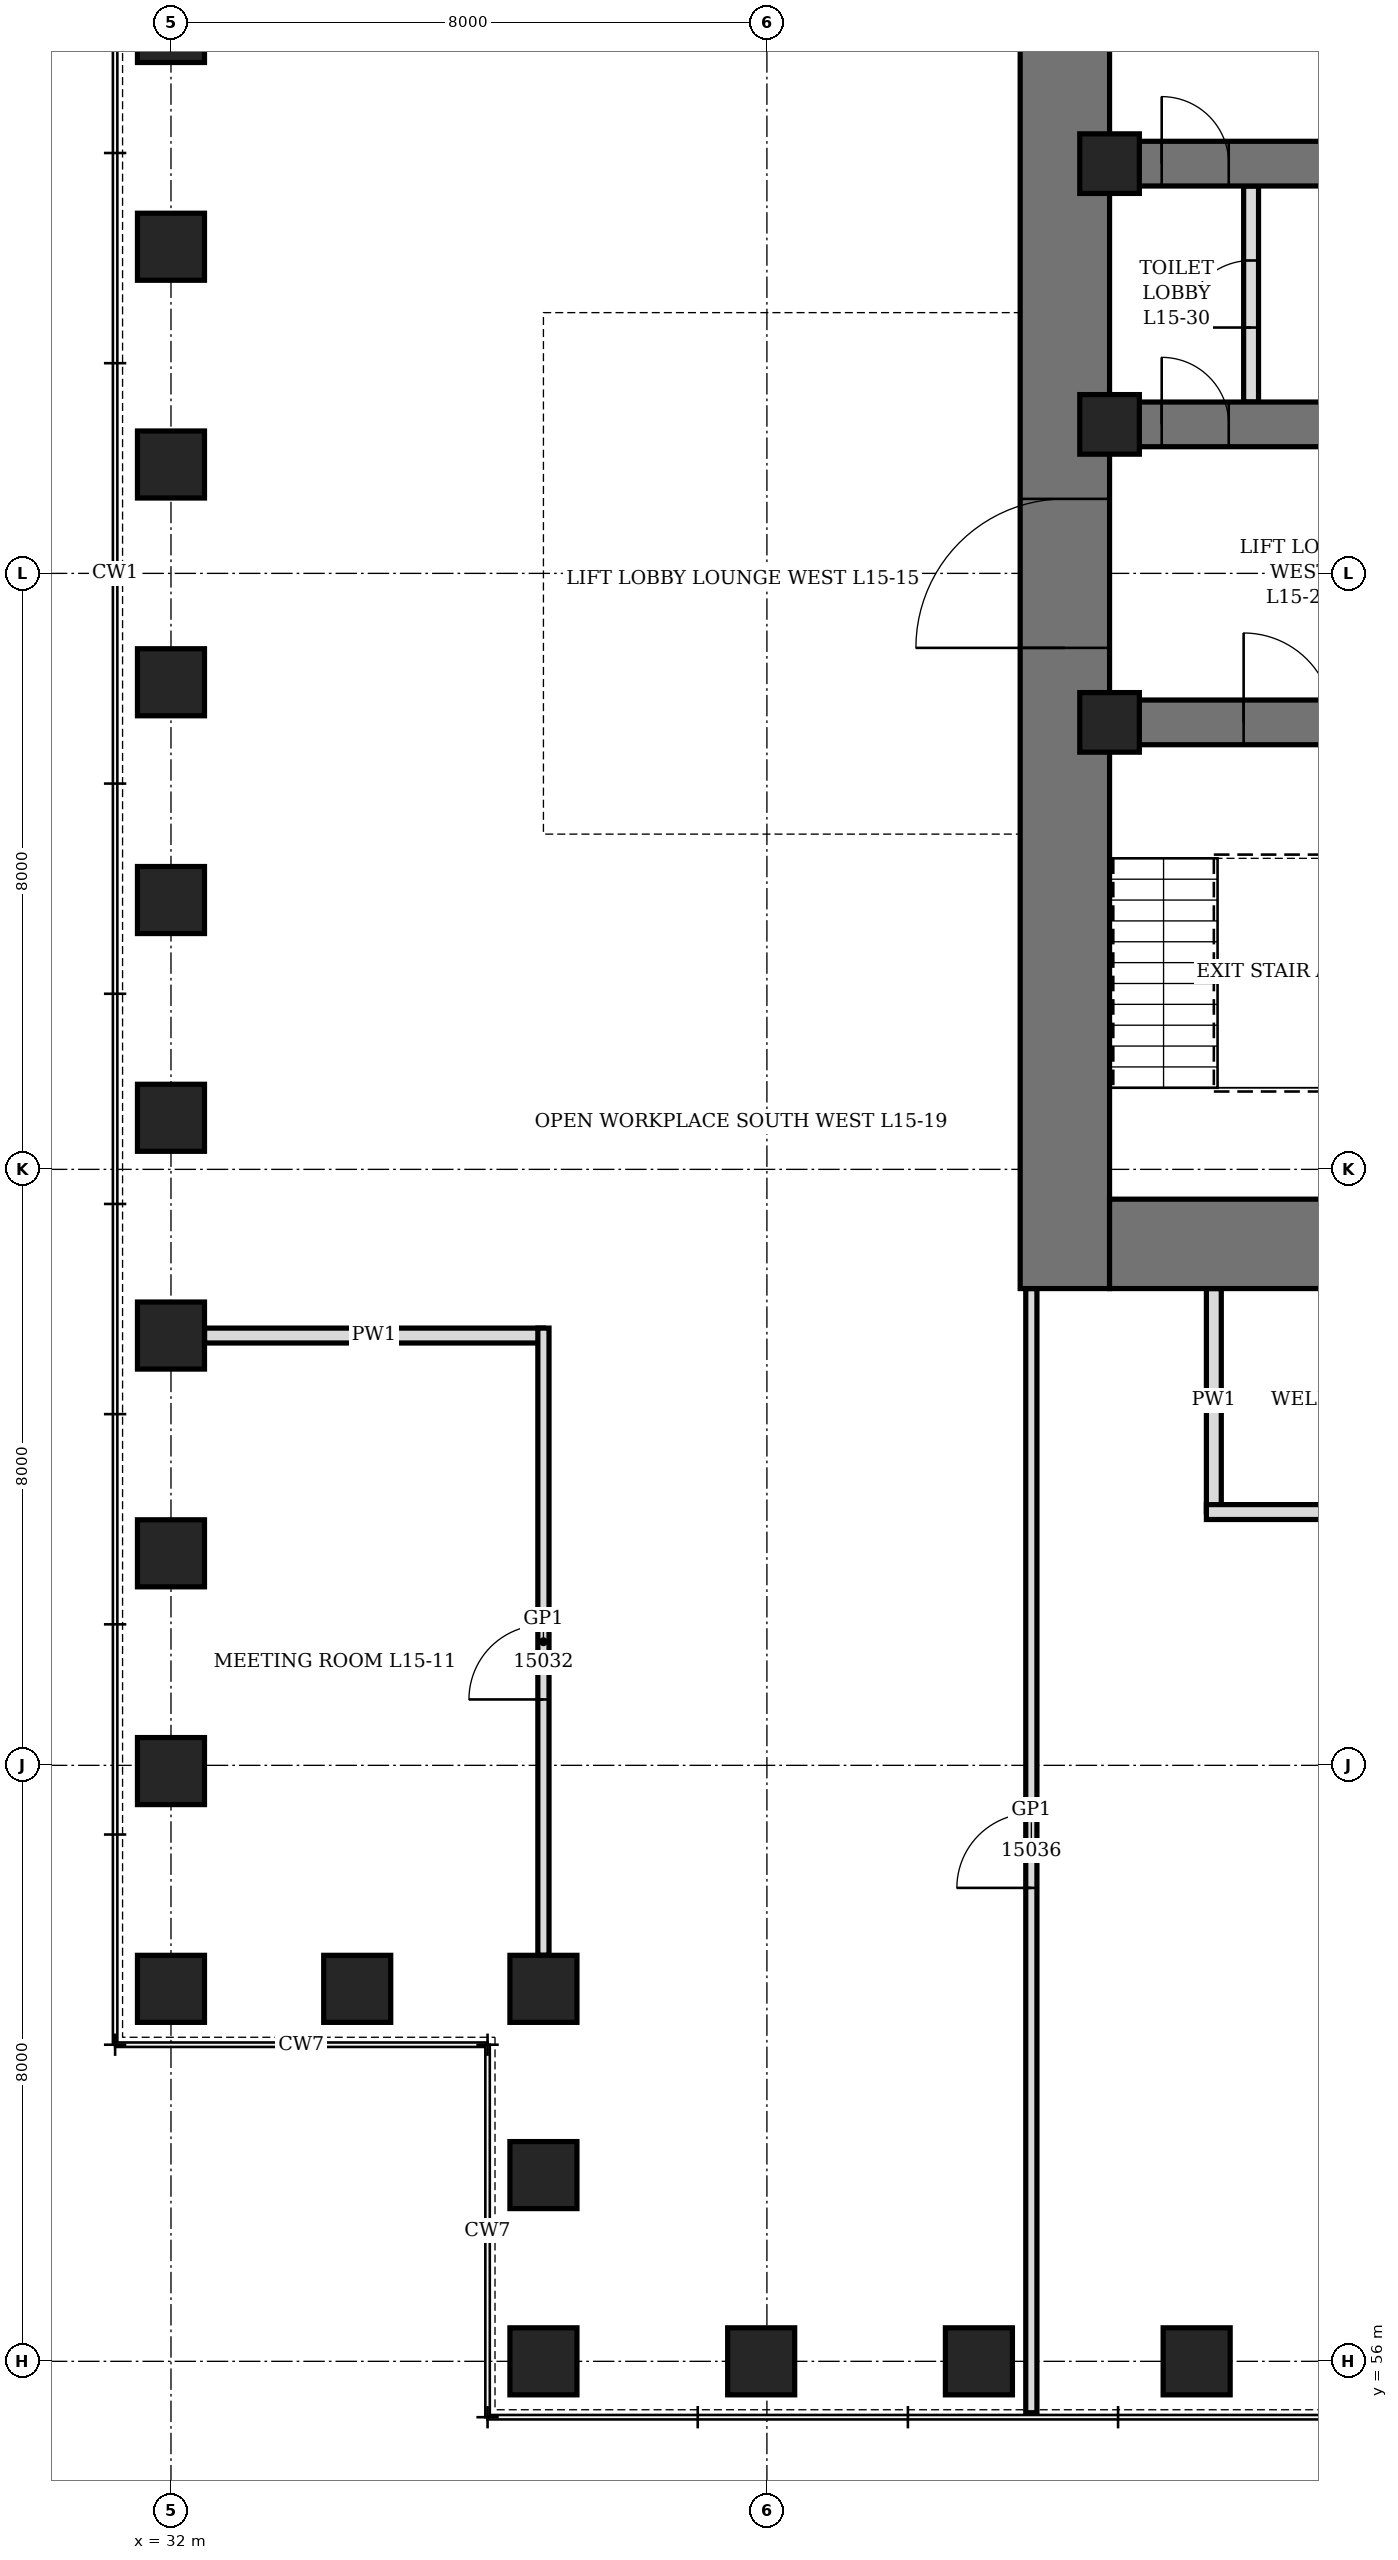
"""IFC4 building model, lengths in metres.
Left out: names, types, materials, properties, quantities, classifications, styles, units other than length and angle.
Written with IfcOpenShell. Run it as: python <this file> out.ifc"""

import sys

from ifc_helpers import new_model, si_unit, direction, frame, frame_2d, origin, origin_2d, place, context, subcontext, project, spatial, rectangle, hollow_rectangle, extrude, element, fill, save


model = new_model("IFC4")
c1 = context("Model", 3, precision=1e-05, world=origin(), true_north=direction((0.0, 1.0)))
c2 = subcontext(c1, "Body", "Model", "MODEL_VIEW")
j1 = project(units=[si_unit("LENGTHUNIT", "METRE"), si_unit("PLANEANGLEUNIT", "RADIAN")], contexts=[c1])
p1 = place(None, origin())
s1 = spatial("IfcSite", under=j1, at=p1, CompositionType="ELEMENT")
p2 = place(p1, origin())
s2 = spatial("IfcBuilding", under=s1, at=p2, CompositionType="ELEMENT")
p3 = place(p2, frame((0.0, 0.0, 72.7)))
s3 = spatial("IfcBuildingStorey", under=s2, at=p3, CompositionType="ELEMENT", Elevation=72.7)
for number, where, z_axis, x_axis in (
    (1, (37.0, 56.0, 0.0), (0.0, 0.0, 1.0), (1.0, 0.0, 0.0)),
    (2, (39.923, 56.0, 0.0), (0.0, 0.0, 1.0), (1.0, 0.0, 0.0)),
    (3, (42.846, 56.0, 0.0), (0.0, 0.0, 1.0), (1.0, 0.0, 0.0)),
    (4, (45.769, 56.0, 0.0), (0.0, 0.0, 1.0), (1.0, 0.0, 0.0)),
    (5, (32.0, 87.308, 0.0), (0.0, 0.0, 1.0), (0.0, 1.0, 0.0)),
    (6, (32.0, 84.385, 0.0), (0.0, 0.0, 1.0), (0.0, 1.0, 0.0)),
    (7, (32.0, 81.461, 0.0), (0.0, 0.0, 1.0), (0.0, 1.0, 0.0)),
    (8, (32.0, 78.539, 0.0), (0.0, 0.0, 1.0), (0.0, 1.0, 0.0)),
    (9, (32.0, 75.615, 0.0), (0.0, 0.0, 1.0), (0.0, 1.0, 0.0)),
    (10, (32.0, 72.692, 0.0), (0.0, 0.0, 1.0), (0.0, 1.0, 0.0)),
    (11, (32.0, 69.769, 0.0), (0.0, 0.0, 1.0), (0.0, 1.0, 0.0)),
    (12, (32.0, 66.846, 0.0), (0.0, 0.0, 1.0), (0.0, 1.0, 0.0)),
    (13, (32.0, 63.923, 0.0), (0.0, 0.0, 1.0), (0.0, 1.0, 0.0)),
    (14, (32.0, 61.0, 0.0), (0.0, 0.0, 1.0), (1.0, 0.0, 0.0)),
    (15, (34.5, 61.0, 0.0), (0.0, 0.0, 1.0), (1.0, 0.0, 0.0)),
    (16, (37.0, 61.0, 0.0), (0.0, 0.0, 1.0), (0.0, 1.0, 0.0)),
    (17, (37.0, 58.5, 0.0), (0.0, 0.0, 1.0), (0.0, 1.0, 0.0)),
):
    element("IfcColumn", number, at=place(p3, frame(where, z_axis=z_axis, x_axis=x_axis)), inside=s3, PredefinedType="COLUMN", context=c2, shape_type="SweptSolid", body=[
        extrude(hollow_rectangle(XDim=0.9, YDim=0.9, WallThickness=0.12, at=origin_2d()), origin(), (0.0, 0.0, 1.0), 4.2),
    ])
p4 = place(p3, frame((44.0, 70.4, 0.0), z_axis=(0.0, 0.0, 1.0), x_axis=(0.0, 1.0, 0.0)))
e18 = element("IfcWall", 18, at=p4, inside=s3, PredefinedType="SHEAR", context=c2, shape_type="SweptSolid", body=[
    extrude(rectangle(XDim=19.2, YDim=1.2, at=frame_2d((9.6, 0.0))), origin(), (0.0, 0.0, 1.0), 4.2),
])
p5 = place(p4, frame((8.6, 0.0, 0.0)))
e19 = element("IfcOpeningElement", 19, at=p5, cuts=e18, PredefinedType="OPENING", context=c2, shape_type="SweptSolid", body=[
    extrude(rectangle(XDim=2.0, YDim=2.4, at=frame_2d((1.0, 1.2))), frame((0.0, 0.61, 0.0), z_axis=(0.0, -1.0, 0.0), x_axis=(1.0, 0.0, 0.0)), (0.0, 0.0, 1.0), 1.22),
])
p6 = place(p3, frame((44.6, 71.0, 0.0), z_axis=(0.0, 0.0, 1.0), x_axis=(1.0, 0.0, 0.0)))
e20 = element("IfcWall", 20, at=p6, inside=s3, PredefinedType="SHEAR", context=c2, shape_type="SweptSolid", body=[
    extrude(rectangle(XDim=22.8, YDim=1.2, at=frame_2d((11.4, 0.0))), origin(), (0.0, 0.0, 1.0), 4.2),
])
p7 = place(p3, frame((44.6, 78.0, 0.0), z_axis=(0.0, 0.0, 1.0), x_axis=(1.0, 0.0, 0.0)))
e21 = element("IfcWall", 21, at=p7, inside=s3, PredefinedType="SHEAR", context=c2, shape_type="SweptSolid", body=[
    extrude(rectangle(XDim=5.1, YDim=0.6, at=frame_2d((2.55, 0.0))), origin(), (0.0, 0.0, 1.0), 4.2),
])
p8 = place(p7, frame((1.8, 0.0, 0.0)))
e22 = element("IfcOpeningElement", 22, at=p8, cuts=e21, PredefinedType="OPENING", context=c2, shape_type="SweptSolid", body=[
    extrude(rectangle(XDim=1.2, YDim=2.1, at=frame_2d((0.6, 1.05))), frame((0.0, 0.31, 0.0), z_axis=(0.0, -1.0, 0.0), x_axis=(1.0, 0.0, 0.0)), (0.0, 0.0, 1.0), 0.62),
])
p9 = place(p3, frame((44.6, 82.0, 0.0), z_axis=(0.0, 0.0, 1.0), x_axis=(1.0, 0.0, 0.0)))
e23 = element("IfcWall", 23, at=p9, inside=s3, PredefinedType="SHEAR", context=c2, shape_type="SweptSolid", body=[
    extrude(rectangle(XDim=5.1, YDim=0.6, at=frame_2d((2.55, 0.0))), origin(), (0.0, 0.0, 1.0), 4.2),
])
p10 = place(p9, frame((0.7, 0.0, 0.0)))
e24 = element("IfcOpeningElement", 24, at=p10, cuts=e23, PredefinedType="OPENING", context=c2, shape_type="SweptSolid", body=[
    extrude(rectangle(XDim=0.9, YDim=2.1, at=frame_2d((0.45, 1.05))), frame((0.0, 0.31, 0.0), z_axis=(0.0, -1.0, 0.0), x_axis=(1.0, 0.0, 0.0)), (0.0, 0.0, 1.0), 0.62),
])
p11 = place(p3, frame((44.6, 85.5, 0.0), z_axis=(0.0, 0.0, 1.0), x_axis=(1.0, 0.0, 0.0)))
e25 = element("IfcWall", 25, at=p11, inside=s3, PredefinedType="SHEAR", context=c2, shape_type="SweptSolid", body=[
    extrude(rectangle(XDim=5.1, YDim=0.6, at=frame_2d((2.55, 0.0))), origin(), (0.0, 0.0, 1.0), 4.2),
])
p12 = place(p11, frame((0.7, 0.0, 0.0)))
e26 = element("IfcOpeningElement", 26, at=p12, cuts=e25, PredefinedType="OPENING", context=c2, shape_type="SweptSolid", body=[
    extrude(rectangle(XDim=0.9, YDim=2.1, at=frame_2d((0.45, 1.05))), frame((0.0, 0.31, 0.0), z_axis=(0.0, -1.0, 0.0), x_axis=(1.0, 0.0, 0.0)), (0.0, 0.0, 1.0), 0.62),
])
for number, where, z_axis, x_axis in (
    (27, (44.6, 78.0, 0.0), (0.0, 0.0, 1.0), (1.0, 0.0, 0.0)),
    (28, (44.6, 82.0, 0.0), (0.0, 0.0, 1.0), (1.0, 0.0, 0.0)),
    (29, (44.6, 85.5, 0.0), (0.0, 0.0, 1.0), (1.0, 0.0, 0.0)),
):
    element("IfcColumn", number, at=place(p3, frame(where, z_axis=z_axis, x_axis=x_axis)), inside=s3, PredefinedType="COLUMN", context=c2, shape_type="SweptSolid", body=[
        extrude(hollow_rectangle(XDim=0.8, YDim=0.8, WallThickness=0.1, at=origin_2d()), origin(), (0.0, 0.0, 1.0), 4.2),
    ])
p13 = place(p3, frame((46.5, 82.3, 0.0), z_axis=(0.0, 0.0, 1.0), x_axis=(0.0, 1.0, 0.0)))
e30 = element("IfcWall", 30, at=p13, inside=s3, PredefinedType="PARTITIONING", context=c2, shape_type="SweptSolid", body=[
    extrude(rectangle(XDim=2.9, YDim=0.2, at=frame_2d((1.45, 0.0))), origin(), (0.0, 0.0, 1.0), 4.04),
])
p14 = place(p13, frame((1.0, 0.0, 0.0)))
e31 = element("IfcOpeningElement", 31, at=p14, cuts=e30, PredefinedType="OPENING", context=c2, shape_type="SweptSolid", body=[
    extrude(rectangle(XDim=0.9, YDim=2.1, at=frame_2d((0.45, 1.05))), frame((0.0, 0.11, 0.0), z_axis=(0.0, -1.0, 0.0), x_axis=(1.0, 0.0, 0.0)), (0.0, 0.0, 1.0), 0.22),
])
p15 = place(p3, frame((32.45, 69.769, 0.0), z_axis=(0.0, 0.0, 1.0), x_axis=(1.0, 0.0, 0.0)))
e32 = element("IfcWall", 32, at=p15, inside=s3, PredefinedType="PARTITIONING", context=c2, shape_type="SweptSolid", body=[
    extrude(rectangle(XDim=4.55, YDim=0.2, at=frame_2d((2.275, 0.0))), origin(), (0.0, 0.0, 1.0), 3.428),
])
p16 = place(p3, frame((46.0, 67.4, 0.0), z_axis=(0.0, 0.0, 1.0), x_axis=(0.0, 1.0, 0.0)))
e33 = element("IfcWall", 33, at=p16, inside=s3, PredefinedType="PARTITIONING", context=c2, shape_type="SweptSolid", body=[
    extrude(rectangle(XDim=3.0, YDim=0.2, at=frame_2d((1.5, 0.0))), origin(), (0.0, 0.0, 1.0), 4.04),
])
p17 = place(p3, frame((45.9, 67.4, 0.0), z_axis=(0.0, 0.0, 1.0), x_axis=(1.0, 0.0, 0.0)))
e34 = element("IfcWall", 34, at=p17, inside=s3, PredefinedType="PARTITIONING", context=c2, shape_type="SweptSolid", body=[
    extrude(rectangle(XDim=14.2, YDim=0.2, at=frame_2d((7.1, 0.0))), origin(), (0.0, 0.0, 1.0), 4.04),
])
p18 = place(p17, frame((2.1, 0.0, 0.0)))
e35 = element("IfcOpeningElement", 35, at=p18, cuts=e34, PredefinedType="OPENING", context=c2, shape_type="SweptSolid", body=[
    extrude(rectangle(XDim=1.0, YDim=2.1, at=frame_2d((0.5, 1.05))), frame((0.0, 0.11, 0.0), z_axis=(0.0, -1.0, 0.0), x_axis=(1.0, 0.0, 0.0)), (0.0, 0.0, 1.0), 0.22),
])
p19 = place(p17, frame((7.1, 0.0, 0.0)))
e36 = element("IfcOpeningElement", 36, at=p19, cuts=e34, PredefinedType="OPENING", context=c2, shape_type="SweptSolid", body=[
    extrude(rectangle(XDim=1.0, YDim=2.1, at=frame_2d((0.5, 1.05))), frame((0.0, 0.11, 0.0), z_axis=(0.0, -1.0, 0.0), x_axis=(1.0, 0.0, 0.0)), (0.0, 0.0, 1.0), 0.22),
])
p20 = place(p17, frame((11.6, 0.0, 0.0)))
e37 = element("IfcOpeningElement", 37, at=p20, cuts=e34, PredefinedType="OPENING", context=c2, shape_type="SweptSolid", body=[
    extrude(rectangle(XDim=1.0, YDim=2.1, at=frame_2d((0.5, 1.05))), frame((0.0, 0.11, 0.0), z_axis=(0.0, -1.0, 0.0), x_axis=(1.0, 0.0, 0.0)), (0.0, 0.0, 1.0), 0.22),
])
p21 = place(p3, frame((37.0, 61.45, 0.0), z_axis=(0.0, 0.0, 1.0), x_axis=(0.0, 1.0, 0.0)))
e38 = element("IfcWall", 38, at=p21, inside=s3, PredefinedType="PARTITIONING", context=c2, shape_type="SweptSolid", body=[
    extrude(rectangle(XDim=8.419, YDim=0.15, at=frame_2d((4.209, 0.0))), origin(), (0.0, 0.0, 1.0), 4.04),
])
p22 = place(p21, frame((3.435, 0.0, 0.0)))
e39 = element("IfcOpeningElement", 39, at=p22, cuts=e38, PredefinedType="OPENING", context=c2, shape_type="SweptSolid", body=[
    extrude(rectangle(XDim=1.0, YDim=2.4, at=frame_2d((0.5, 1.2))), frame((0.0, 0.085, 0.0), z_axis=(0.0, -1.0, 0.0), x_axis=(1.0, 0.0, 0.0)), (0.0, 0.0, 1.0), 0.17),
])
p23 = place(p3, frame((43.55, 55.31, 0.0), z_axis=(0.0, 0.0, 1.0), x_axis=(0.0, 1.0, 0.0)))
e40 = element("IfcWall", 40, at=p23, inside=s3, PredefinedType="PARTITIONING", context=c2, shape_type="SweptSolid", body=[
    extrude(rectangle(XDim=15.09, YDim=0.15, at=frame_2d((7.545, 0.0))), origin(), (0.0, 0.0, 1.0), 4.04),
])
p24 = place(p23, frame((7.045, 0.0, 0.0)))
e41 = element("IfcOpeningElement", 41, at=p24, cuts=e40, PredefinedType="OPENING", context=c2, shape_type="SweptSolid", body=[
    extrude(rectangle(XDim=1.0, YDim=2.4, at=frame_2d((0.5, 1.2))), frame((0.0, 0.085, 0.0), z_axis=(0.0, -1.0, 0.0), x_axis=(1.0, 0.0, 0.0)), (0.0, 0.0, 1.0), 0.17),
])
p25 = place(p10, origin())
e42 = element("IfcDoor", 42, at=p25, inside=s3, OperationType="SINGLE_SWING_LEFT", PredefinedType="DOOR", context=c2, shape_type="SweptSolid", body=[
    extrude(rectangle(XDim=0.9, YDim=2.1, at=frame_2d((0.45, 1.05))), frame((0.0, 0.3, 0.0), z_axis=(0.0, -1.0, 0.0), x_axis=(1.0, 0.0, 0.0)), (0.0, 0.0, 1.0), 0.6),
])
fill(e24, e42)
p26 = place(p14, origin())
e43 = element("IfcDoor", 43, at=p26, inside=s3, OperationType="SINGLE_SWING_RIGHT", PredefinedType="DOOR", context=c2, shape_type="SweptSolid", body=[
    extrude(rectangle(XDim=0.9, YDim=2.1, at=frame_2d((0.45, 1.05))), frame((0.0, 0.1, 0.0), z_axis=(0.0, -1.0, 0.0), x_axis=(1.0, 0.0, 0.0)), (0.0, 0.0, 1.0), 0.199),
])
fill(e31, e43)
p27 = place(p12, origin())
e44 = element("IfcDoor", 44, at=p27, inside=s3, OperationType="SINGLE_SWING_RIGHT", PredefinedType="DOOR", context=c2, shape_type="SweptSolid", body=[
    extrude(rectangle(XDim=0.9, YDim=2.1, at=frame_2d((0.45, 1.05))), frame((0.0, 0.3, 0.0), z_axis=(0.0, -1.0, 0.0), x_axis=(1.0, 0.0, 0.0)), (0.0, 0.0, 1.0), 0.6),
])
fill(e26, e44)
p28 = place(p8, origin())
e45 = element("IfcDoor", 45, at=p28, inside=s3, OperationType="SINGLE_SWING_LEFT", PredefinedType="DOOR", context=c2, shape_type="SweptSolid", body=[
    extrude(rectangle(XDim=1.2, YDim=2.1, at=frame_2d((0.6, 1.05))), frame((0.0, 0.3, 0.0), z_axis=(0.0, -1.0, 0.0), x_axis=(1.0, 0.0, 0.0)), (0.0, 0.0, 1.0), 0.6),
])
fill(e22, e45)
p29 = place(p5, origin())
e46 = element("IfcDoor", 46, at=p29, inside=s3, OperationType="DOUBLE_DOOR_SINGLE_SWING", PredefinedType="DOOR", context=c2, shape_type="SweptSolid", body=[
    extrude(rectangle(XDim=2.0, YDim=2.4, at=frame_2d((1.0, 1.2))), frame((0.0, 0.35, 0.0), z_axis=(0.0, -1.0, 0.0), x_axis=(1.0, 0.0, 0.0)), (0.0, 0.0, 1.0), 0.7),
])
fill(e19, e46)
p30 = place(p22, origin())
e47 = element("IfcDoor", 47, at=p30, inside=s3, OperationType="SINGLE_SWING_RIGHT", PredefinedType="DOOR", context=c2, shape_type="SweptSolid", body=[
    extrude(rectangle(XDim=1.0, YDim=2.4, at=frame_2d((0.5, 1.2))), frame((0.0, 0.075, 0.0), z_axis=(0.0, -1.0, 0.0), x_axis=(1.0, 0.0, 0.0)), (0.0, 0.0, 1.0), 0.149),
])
fill(e39, e47)
p31 = place(p24, origin())
e48 = element("IfcDoor", 48, at=p31, inside=s3, OperationType="SINGLE_SWING_RIGHT", PredefinedType="DOOR", context=c2, shape_type="SweptSolid", body=[
    extrude(rectangle(XDim=1.0, YDim=2.4, at=frame_2d((0.5, 1.2))), frame((0.0, 0.075, 0.0), z_axis=(0.0, -1.0, 0.0), x_axis=(1.0, 0.0, 0.0)), (0.0, 0.0, 1.0), 0.149),
])
fill(e41, e48)
save(model, sys.argv[1])
